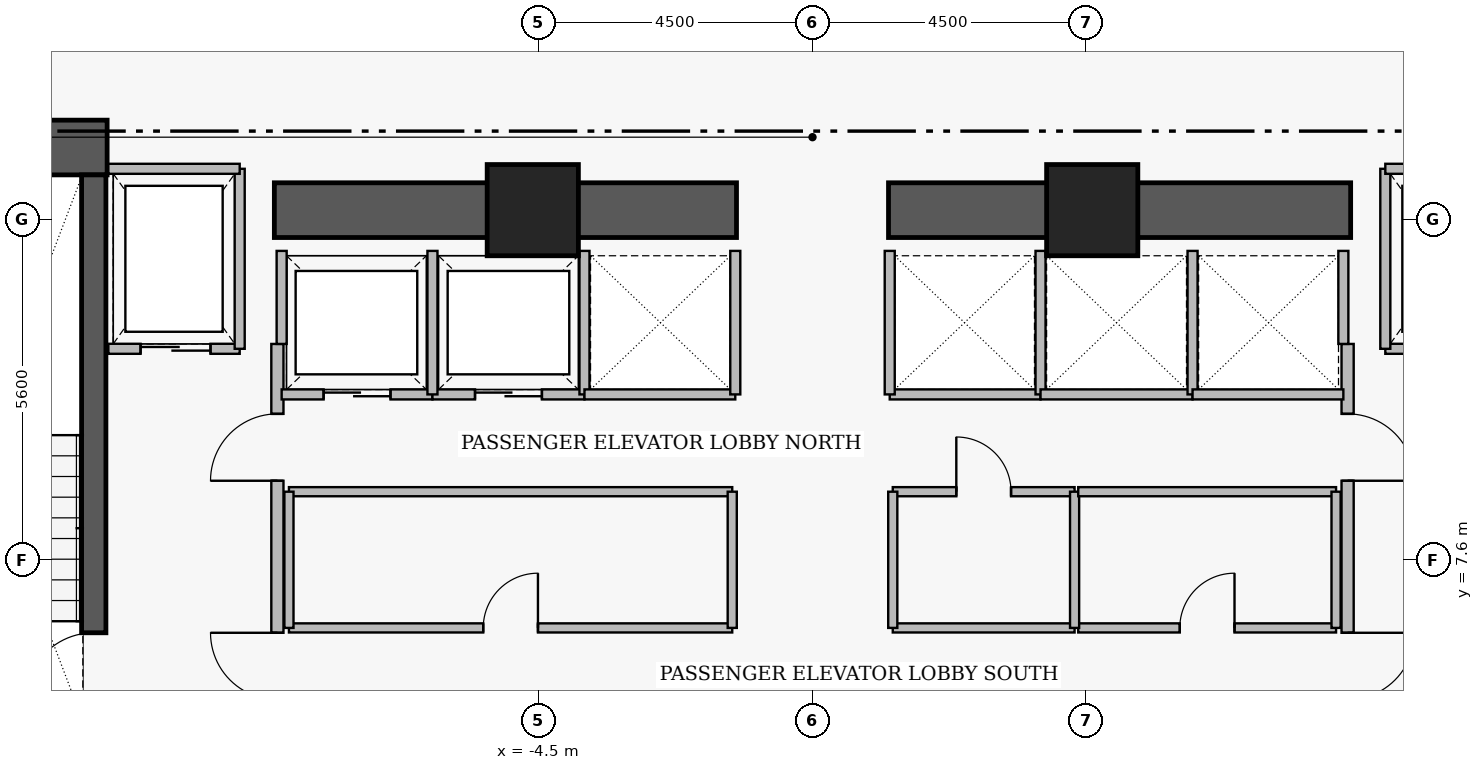
"""IFC4 building model, lengths in metres.
Left out: names, types, materials, properties, quantities, classifications, styles, units other than length and angle.
Written with IfcOpenShell. Run it as: python <this file> out.ifc"""

import sys

from ifc_helpers import new_model, si_unit, direction, frame, frame_2d, origin, origin_2d, place, context, subcontext, project, spatial, rectangle, extrude, element, fill, save


model = new_model("IFC4")
c1 = context("Model", 3, precision=1e-05, world=origin(), true_north=direction((0.0, 1.0)))
c2 = subcontext(c1, "Body", "Model", "MODEL_VIEW")
j1 = project(units=[si_unit("LENGTHUNIT", "METRE"), si_unit("PLANEANGLEUNIT", "RADIAN")], contexts=[c1])
p1 = place(None, origin())
s1 = spatial("IfcSite", under=j1, at=p1, CompositionType="ELEMENT")
p2 = place(p1, origin())
s2 = spatial("IfcBuilding", under=s1, at=p2, CompositionType="ELEMENT")
p3 = place(p2, frame((0.0, 0.0, 60.45)))
s3 = spatial("IfcBuildingStorey", under=s2, at=p3, CompositionType="ELEMENT", Elevation=60.45)
p4 = place(p3, frame((-16.31, 14.38, 0.0), z_axis=(0.0, 0.0, 1.0), x_axis=(1.0, 0.0, 0.0)))
e1 = element("IfcWall", 1, at=p4, inside=s3, PredefinedType="SHEAR", context=c2, shape_type="SweptSolid", body=[
    extrude(rectangle(XDim=4.71, YDim=0.9, at=frame_2d((2.355, 0.0))), origin(), (0.0, 0.0, 1.0), 3.46),
])
for number, where, z_axis, x_axis in (
    (2, (-8.85, 13.35, 0.0), (0.0, 0.0, 1.0), (1.0, 0.0, 0.0)),
    (3, (1.25, 13.35, 0.0), (0.0, 0.0, 1.0), (1.0, 0.0, 0.0)),
):
    element("IfcWall", number, at=place(p3, frame(where, z_axis=z_axis, x_axis=x_axis)), inside=s3, PredefinedType="SHEAR", context=c2, shape_type="SweptSolid", body=[
        extrude(rectangle(XDim=7.6, YDim=0.9, at=frame_2d((3.8, 0.0))), origin(), (0.0, 0.0, 1.0), 3.43),
    ])
p5 = place(p3, frame((-11.82, 4.97, 0.0), z_axis=(0.0, 0.0, 1.0), x_axis=(0.0, 1.0, 0.0)))
e4 = element("IfcWall", 4, at=p5, inside=s3, PredefinedType="SHEAR", context=c2, shape_type="SweptSolid", body=[
    extrude(rectangle(XDim=8.96, YDim=0.4, at=frame_2d((4.48, 0.0))), origin(), (0.0, 0.0, 1.0), 3.46),
])
p6 = place(p5, frame((0.31, 0.0, 0.0)))
e5 = element("IfcOpeningElement", 5, at=p6, cuts=e4, PredefinedType="OPENING", context=c2, shape_type="SweptSolid", body=[
    extrude(rectangle(XDim=1.12, YDim=2.22, at=frame_2d((0.56, 1.11))), frame((0.0, 0.21, 0.0), z_axis=(0.0, -1.0, 0.0), x_axis=(1.0, 0.0, 0.0)), (0.0, 0.0, 1.0), 0.42),
])
for number, where, z_axis, x_axis in (
    (6, (-4.6, 13.35, 0.0), (0.0, 0.0, 1.0), (1.0, 0.0, 0.0)),
    (7, (4.6, 13.35, 0.0), (0.0, 0.0, 1.0), (1.0, 0.0, 0.0)),
):
    element("IfcColumn", number, at=place(p3, frame(where, z_axis=z_axis, x_axis=x_axis)), inside=s3, PredefinedType="COLUMN", context=c2, shape_type="SweptSolid", body=[
        extrude(rectangle(XDim=1.5, YDim=1.5, at=origin_2d()), origin(), (0.0, 0.0, 1.0), 3.65),
    ])
p7 = place(p3, frame((-8.8, 5.05, 0.0), z_axis=(0.0, 0.0, 1.0), x_axis=(0.0, 1.0, 0.0)))
e8 = element("IfcWall", 8, at=p7, inside=s3, PredefinedType="PARTITIONING", context=c2, shape_type="SweptSolid", body=[
    extrude(rectangle(XDim=6.1, YDim=0.2, at=frame_2d((3.05, 0.0))), origin(), (0.0, 0.0, 1.0), 3.43),
])
p8 = place(p7, frame((0.25, 0.0, 0.0)))
e9 = element("IfcOpeningElement", 9, at=p8, cuts=e8, PredefinedType="OPENING", context=c2, shape_type="SweptSolid", body=[
    extrude(rectangle(XDim=1.1, YDim=2.2, at=frame_2d((0.55, 1.1))), frame((0.0, 0.11, 0.0), z_axis=(0.0, -1.0, 0.0), x_axis=(1.0, 0.0, 0.0)), (0.0, 0.0, 1.0), 0.22),
])
p9 = place(p7, frame((3.85, 0.0, 0.0)))
e10 = element("IfcOpeningElement", 10, at=p9, cuts=e8, PredefinedType="OPENING", context=c2, shape_type="SweptSolid", body=[
    extrude(rectangle(XDim=1.1, YDim=2.2, at=frame_2d((0.55, 1.1))), frame((0.0, 0.11, 0.0), z_axis=(0.0, -1.0, 0.0), x_axis=(1.0, 0.0, 0.0)), (0.0, 0.0, 1.0), 0.22),
])
p10 = place(p3, frame((8.8, 11.15, 0.0), z_axis=(0.0, 0.0, 1.0), x_axis=(0.0, -1.0, 0.0)))
e11 = element("IfcWall", 11, at=p10, inside=s3, PredefinedType="PARTITIONING", context=c2, shape_type="SweptSolid", body=[
    extrude(rectangle(XDim=6.1, YDim=0.2, at=frame_2d((3.05, 0.0))), origin(), (0.0, 0.0, 1.0), 3.43),
])
p11 = place(p10, frame((1.15, 0.0, 0.0)))
e12 = element("IfcOpeningElement", 12, at=p11, cuts=e11, PredefinedType="OPENING", context=c2, shape_type="SweptSolid", body=[
    extrude(rectangle(XDim=1.1, YDim=2.2, at=frame_2d((0.55, 1.1))), frame((0.0, 0.11, 0.0), z_axis=(0.0, -1.0, 0.0), x_axis=(1.0, 0.0, 0.0)), (0.0, 0.0, 1.0), 0.22),
])
p12 = place(p10, frame((4.75, 0.0, 0.0)))
e13 = element("IfcOpeningElement", 13, at=p12, cuts=e11, PredefinedType="OPENING", context=c2, shape_type="SweptSolid", body=[
    extrude(rectangle(XDim=1.1, YDim=2.2, at=frame_2d((0.55, 1.1))), frame((0.0, 0.11, 0.0), z_axis=(0.0, -1.0, 0.0), x_axis=(1.0, 0.0, 0.0)), (0.0, 0.0, 1.0), 0.22),
])
p13 = place(p3, frame((-11.58, 11.07, 0.0), z_axis=(0.0, 0.0, 1.0), x_axis=(1.0, 0.0, 0.0)))
e14 = element("IfcWall", 14, at=p13, inside=s3, PredefinedType="PARTITIONING", context=c2, shape_type="SweptSolid", body=[
    extrude(rectangle(XDim=2.16, YDim=0.165, at=frame_2d((1.08, 0.0))), origin(), (0.0, 0.0, 1.0), 3.43),
])
p14 = place(p13, frame((0.53, 0.0, 0.0)))
e15 = element("IfcOpeningElement", 15, at=p14, cuts=e14, PredefinedType="OPENING", context=c2, shape_type="SweptSolid", body=[
    extrude(rectangle(XDim=1.15, YDim=2.25, at=frame_2d((0.575, 1.125))), frame((0.0, 0.093, 0.0), z_axis=(0.0, -1.0, 0.0), x_axis=(1.0, 0.0, 0.0)), (0.0, 0.0, 1.0), 0.185),
])
p15 = place(p3, frame((9.42, 11.07, 0.0), z_axis=(0.0, 0.0, 1.0), x_axis=(1.0, 0.0, 0.0)))
e16 = element("IfcWall", 16, at=p15, inside=s3, PredefinedType="PARTITIONING", context=c2, shape_type="SweptSolid", body=[
    extrude(rectangle(XDim=2.16, YDim=0.165, at=frame_2d((1.08, 0.0))), origin(), (0.0, 0.0, 1.0), 3.43),
])
p16 = place(p15, frame((0.53, 0.0, 0.0)))
e17 = element("IfcOpeningElement", 17, at=p16, cuts=e16, PredefinedType="OPENING", context=c2, shape_type="SweptSolid", body=[
    extrude(rectangle(XDim=1.15, YDim=2.25, at=frame_2d((0.575, 1.125))), frame((0.0, 0.093, 0.0), z_axis=(0.0, -1.0, 0.0), x_axis=(1.0, 0.0, 0.0)), (0.0, 0.0, 1.0), 0.185),
])
p17 = place(p3, frame((-8.73, 10.32, 0.0), z_axis=(0.0, 0.0, 1.0), x_axis=(1.0, 0.0, 0.0)))
e18 = element("IfcWall", 18, at=p17, inside=s3, PredefinedType="PARTITIONING", context=c2, shape_type="SweptSolid", body=[
    extrude(rectangle(XDim=2.48, YDim=0.165, at=frame_2d((1.24, 0.0))), origin(), (0.0, 0.0, 1.0), 3.43),
])
p18 = place(p17, frame((0.69, 0.0, 0.0)))
e19 = element("IfcOpeningElement", 19, at=p18, cuts=e18, PredefinedType="OPENING", context=c2, shape_type="SweptSolid", body=[
    extrude(rectangle(XDim=1.1, YDim=2.25, at=frame_2d((0.55, 1.125))), frame((0.0, 0.093, 0.0), z_axis=(0.0, -1.0, 0.0), x_axis=(1.0, 0.0, 0.0)), (0.0, 0.0, 1.0), 0.185),
])
p19 = place(p3, frame((-6.25, 10.32, 0.0), z_axis=(0.0, 0.0, 1.0), x_axis=(1.0, 0.0, 0.0)))
e20 = element("IfcWall", 20, at=p19, inside=s3, PredefinedType="PARTITIONING", context=c2, shape_type="SweptSolid", body=[
    extrude(rectangle(XDim=2.5, YDim=0.165, at=frame_2d((1.25, 0.0))), origin(), (0.0, 0.0, 1.0), 3.43),
])
p20 = place(p19, frame((0.7, 0.0, 0.0)))
e21 = element("IfcOpeningElement", 21, at=p20, cuts=e20, PredefinedType="OPENING", context=c2, shape_type="SweptSolid", body=[
    extrude(rectangle(XDim=1.1, YDim=2.25, at=frame_2d((0.55, 1.125))), frame((0.0, 0.093, 0.0), z_axis=(0.0, -1.0, 0.0), x_axis=(1.0, 0.0, 0.0)), (0.0, 0.0, 1.0), 0.185),
])
p21 = place(p3, frame((-8.61, 6.48, 0.0), z_axis=(0.0, 0.0, 1.0), x_axis=(1.0, 0.0, 0.0)))
e22 = element("IfcWall", 22, at=p21, inside=s3, PredefinedType="PARTITIONING", context=c2, shape_type="SweptSolid", body=[
    extrude(rectangle(XDim=7.29, YDim=0.15, at=frame_2d((3.645, 0.0))), origin(), (0.0, 0.0, 1.0), 3.43),
])
p22 = place(p21, frame((3.195, 0.0, 0.0)))
e23 = element("IfcOpeningElement", 23, at=p22, cuts=e22, PredefinedType="OPENING", context=c2, shape_type="SweptSolid", body=[
    extrude(rectangle(XDim=0.9, YDim=2.15, at=frame_2d((0.45, 1.075))), frame((0.0, 0.085, 0.0), z_axis=(0.0, -1.0, 0.0), x_axis=(1.0, 0.0, 0.0)), (0.0, 0.0, 1.0), 0.17),
])
p23 = place(p3, frame((1.32, 8.72, 0.0), z_axis=(0.0, 0.0, 1.0), x_axis=(1.0, 0.0, 0.0)))
e24 = element("IfcWall", 24, at=p23, inside=s3, PredefinedType="PARTITIONING", context=c2, shape_type="SweptSolid", body=[
    extrude(rectangle(XDim=2.99, YDim=0.15, at=frame_2d((1.495, 0.0))), origin(), (0.0, 0.0, 1.0), 3.43),
])
p24 = place(p23, frame((1.045, 0.0, 0.0)))
e25 = element("IfcOpeningElement", 25, at=p24, cuts=e24, PredefinedType="OPENING", context=c2, shape_type="SweptSolid", body=[
    extrude(rectangle(XDim=0.9, YDim=2.15, at=frame_2d((0.45, 1.075))), frame((0.0, 0.085, 0.0), z_axis=(0.0, -1.0, 0.0), x_axis=(1.0, 0.0, 0.0)), (0.0, 0.0, 1.0), 0.17),
])
p25 = place(p3, frame((4.37, 6.48, 0.0), z_axis=(0.0, 0.0, 1.0), x_axis=(1.0, 0.0, 0.0)))
e26 = element("IfcWall", 26, at=p25, inside=s3, PredefinedType="PARTITIONING", context=c2, shape_type="SweptSolid", body=[
    extrude(rectangle(XDim=4.24, YDim=0.15, at=frame_2d((2.12, 0.0))), origin(), (0.0, 0.0, 1.0), 3.43),
])
p26 = place(p25, frame((1.67, 0.0, 0.0)))
e27 = element("IfcOpeningElement", 27, at=p26, cuts=e26, PredefinedType="OPENING", context=c2, shape_type="SweptSolid", body=[
    extrude(rectangle(XDim=0.9, YDim=2.15, at=frame_2d((0.45, 1.075))), frame((0.0, 0.085, 0.0), z_axis=(0.0, -1.0, 0.0), x_axis=(1.0, 0.0, 0.0)), (0.0, 0.0, 1.0), 0.17),
])
p27 = place(p3, frame((-9.42, 11.07, 0.0), z_axis=(0.0, 0.0, 1.0), x_axis=(0.0, 1.0, 0.0)))
e28 = element("IfcWall", 28, at=p27, inside=s3, PredefinedType="PARTITIONING", context=c2, shape_type="SweptSolid", body=[
    extrude(rectangle(XDim=2.96, YDim=0.165, at=frame_2d((1.48, 0.0))), origin(), (0.0, 0.0, 1.0), 3.43),
])
p28 = place(p3, frame((-11.58, 14.03, 0.0), z_axis=(0.0, 0.0, 1.0), x_axis=(1.0, 0.0, 0.0)))
e29 = element("IfcWall", 29, at=p28, inside=s3, PredefinedType="PARTITIONING", context=c2, shape_type="SweptSolid", body=[
    extrude(rectangle(XDim=2.16, YDim=0.165, at=frame_2d((1.08, 0.0))), origin(), (0.0, 0.0, 1.0), 3.43),
])
p29 = place(p3, frame((9.42, 11.07, 0.0), z_axis=(0.0, 0.0, 1.0), x_axis=(0.0, 1.0, 0.0)))
e30 = element("IfcWall", 30, at=p29, inside=s3, PredefinedType="PARTITIONING", context=c2, shape_type="SweptSolid", body=[
    extrude(rectangle(XDim=2.96, YDim=0.165, at=frame_2d((1.48, 0.0))), origin(), (0.0, 0.0, 1.0), 3.43),
])
p30 = place(p3, frame((9.42, 14.03, 0.0), z_axis=(0.0, 0.0, 1.0), x_axis=(1.0, 0.0, 0.0)))
e31 = element("IfcWall", 31, at=p30, inside=s3, PredefinedType="PARTITIONING", context=c2, shape_type="SweptSolid", body=[
    extrude(rectangle(XDim=2.16, YDim=0.165, at=frame_2d((1.08, 0.0))), origin(), (0.0, 0.0, 1.0), 3.43),
])
p31 = place(p3, frame((-8.73, 11.15, 0.0), z_axis=(0.0, 0.0, 1.0), x_axis=(0.0, 1.0, 0.0)))
e32 = element("IfcWall", 32, at=p31, inside=s3, PredefinedType="PARTITIONING", context=c2, shape_type="SweptSolid", body=[
    extrude(rectangle(XDim=1.53, YDim=0.165, at=frame_2d((0.765, 0.0))), origin(), (0.0, 0.0, 1.0), 3.43),
])
for number, where, z_axis, x_axis in (
    (33, (-6.25, 10.32, 0.0), (0.0, 0.0, 1.0), (0.0, 1.0, 0.0)),
    (34, (-3.75, 10.32, 0.0), (0.0, 0.0, 1.0), (0.0, 1.0, 0.0)),
):
    element("IfcWall", number, at=place(p3, frame(where, z_axis=z_axis, x_axis=x_axis)), inside=s3, PredefinedType="PARTITIONING", context=c2, shape_type="SweptSolid", body=[
        extrude(rectangle(XDim=2.36, YDim=0.165, at=frame_2d((1.18, 0.0))), origin(), (0.0, 0.0, 1.0), 3.43),
    ])
p32 = place(p3, frame((-3.75, 10.32, 0.0), z_axis=(0.0, 0.0, 1.0), x_axis=(1.0, 0.0, 0.0)))
e35 = element("IfcWall", 35, at=p32, inside=s3, PredefinedType="PARTITIONING", context=c2, shape_type="SweptSolid", body=[
    extrude(rectangle(XDim=2.48, YDim=0.165, at=frame_2d((1.24, 0.0))), origin(), (0.0, 0.0, 1.0), 3.43),
])
p33 = place(p3, frame((-1.27, 10.32, 0.0), z_axis=(0.0, 0.0, 1.0), x_axis=(0.0, 1.0, 0.0)))
e36 = element("IfcWall", 36, at=p33, inside=s3, PredefinedType="PARTITIONING", context=c2, shape_type="SweptSolid", body=[
    extrude(rectangle(XDim=2.36, YDim=0.165, at=frame_2d((1.18, 0.0))), origin(), (0.0, 0.0, 1.0), 3.43),
])
p34 = place(p3, frame((1.27, 10.32, 0.0), z_axis=(0.0, 0.0, 1.0), x_axis=(1.0, 0.0, 0.0)))
e37 = element("IfcWall", 37, at=p34, inside=s3, PredefinedType="PARTITIONING", context=c2, shape_type="SweptSolid", body=[
    extrude(rectangle(XDim=2.48, YDim=0.165, at=frame_2d((1.24, 0.0))), origin(), (0.0, 0.0, 1.0), 3.43),
])
for number, where, z_axis, x_axis in (
    (38, (1.27, 10.32, 0.0), (0.0, 0.0, 1.0), (0.0, 1.0, 0.0)),
    (39, (3.75, 10.32, 0.0), (0.0, 0.0, 1.0), (0.0, 1.0, 0.0)),
):
    element("IfcWall", number, at=place(p3, frame(where, z_axis=z_axis, x_axis=x_axis)), inside=s3, PredefinedType="PARTITIONING", context=c2, shape_type="SweptSolid", body=[
        extrude(rectangle(XDim=2.36, YDim=0.165, at=frame_2d((1.18, 0.0))), origin(), (0.0, 0.0, 1.0), 3.43),
    ])
p35 = place(p3, frame((3.75, 10.32, 0.0), z_axis=(0.0, 0.0, 1.0), x_axis=(1.0, 0.0, 0.0)))
e40 = element("IfcWall", 40, at=p35, inside=s3, PredefinedType="PARTITIONING", context=c2, shape_type="SweptSolid", body=[
    extrude(rectangle(XDim=2.5, YDim=0.165, at=frame_2d((1.25, 0.0))), origin(), (0.0, 0.0, 1.0), 3.43),
])
p36 = place(p3, frame((6.25, 10.32, 0.0), z_axis=(0.0, 0.0, 1.0), x_axis=(0.0, 1.0, 0.0)))
e41 = element("IfcWall", 41, at=p36, inside=s3, PredefinedType="PARTITIONING", context=c2, shape_type="SweptSolid", body=[
    extrude(rectangle(XDim=2.36, YDim=0.165, at=frame_2d((1.18, 0.0))), origin(), (0.0, 0.0, 1.0), 3.43),
])
p37 = place(p3, frame((6.25, 10.32, 0.0), z_axis=(0.0, 0.0, 1.0), x_axis=(1.0, 0.0, 0.0)))
e42 = element("IfcWall", 42, at=p37, inside=s3, PredefinedType="PARTITIONING", context=c2, shape_type="SweptSolid", body=[
    extrude(rectangle(XDim=2.48, YDim=0.165, at=frame_2d((1.24, 0.0))), origin(), (0.0, 0.0, 1.0), 3.43),
])
p38 = place(p3, frame((8.73, 11.15, 0.0), z_axis=(0.0, 0.0, 1.0), x_axis=(0.0, 1.0, 0.0)))
e43 = element("IfcWall", 43, at=p38, inside=s3, PredefinedType="PARTITIONING", context=c2, shape_type="SweptSolid", body=[
    extrude(rectangle(XDim=1.53, YDim=0.165, at=frame_2d((0.765, 0.0))), origin(), (0.0, 0.0, 1.0), 3.43),
])
p39 = place(p3, frame((-8.61, 8.72, 0.0), z_axis=(0.0, 0.0, 1.0), x_axis=(1.0, 0.0, 0.0)))
e44 = element("IfcWall", 44, at=p39, inside=s3, PredefinedType="PARTITIONING", context=c2, shape_type="SweptSolid", body=[
    extrude(rectangle(XDim=7.29, YDim=0.15, at=frame_2d((3.645, 0.0))), origin(), (0.0, 0.0, 1.0), 3.43),
])
for number, where, z_axis, x_axis in (
    (45, (-8.61, 6.48, 0.0), (0.0, 0.0, 1.0), (0.0, 1.0, 0.0)),
    (46, (-1.32, 6.48, 0.0), (0.0, 0.0, 1.0), (0.0, 1.0, 0.0)),
):
    element("IfcWall", number, at=place(p3, frame(where, z_axis=z_axis, x_axis=x_axis)), inside=s3, PredefinedType="PARTITIONING", context=c2, shape_type="SweptSolid", body=[
        extrude(rectangle(XDim=2.24, YDim=0.15, at=frame_2d((1.12, 0.0))), origin(), (0.0, 0.0, 1.0), 3.43),
    ])
p40 = place(p3, frame((1.32, 6.48, 0.0), z_axis=(0.0, 0.0, 1.0), x_axis=(1.0, 0.0, 0.0)))
e47 = element("IfcWall", 47, at=p40, inside=s3, PredefinedType="PARTITIONING", context=c2, shape_type="SweptSolid", body=[
    extrude(rectangle(XDim=2.99, YDim=0.15, at=frame_2d((1.495, 0.0))), origin(), (0.0, 0.0, 1.0), 3.43),
])
for number, where, z_axis, x_axis in (
    (48, (1.32, 6.48, 0.0), (0.0, 0.0, 1.0), (0.0, 1.0, 0.0)),
    (49, (4.31, 6.48, 0.0), (0.0, 0.0, 1.0), (0.0, 1.0, 0.0)),
):
    element("IfcWall", number, at=place(p3, frame(where, z_axis=z_axis, x_axis=x_axis)), inside=s3, PredefinedType="PARTITIONING", context=c2, shape_type="SweptSolid", body=[
        extrude(rectangle(XDim=2.24, YDim=0.15, at=frame_2d((1.12, 0.0))), origin(), (0.0, 0.0, 1.0), 3.43),
    ])
p41 = place(p3, frame((4.37, 8.72, 0.0), z_axis=(0.0, 0.0, 1.0), x_axis=(1.0, 0.0, 0.0)))
e50 = element("IfcWall", 50, at=p41, inside=s3, PredefinedType="PARTITIONING", context=c2, shape_type="SweptSolid", body=[
    extrude(rectangle(XDim=4.24, YDim=0.15, at=frame_2d((2.12, 0.0))), origin(), (0.0, 0.0, 1.0), 3.43),
])
p42 = place(p3, frame((8.61, 6.48, 0.0), z_axis=(0.0, 0.0, 1.0), x_axis=(0.0, 1.0, 0.0)))
e51 = element("IfcWall", 51, at=p42, inside=s3, PredefinedType="PARTITIONING", context=c2, shape_type="SweptSolid", body=[
    extrude(rectangle(XDim=2.24, YDim=0.15, at=frame_2d((1.12, 0.0))), origin(), (0.0, 0.0, 1.0), 3.43),
])
p43 = place(p6, origin())
e52 = element("IfcDoor", 52, at=p43, inside=s3, OperationType="SINGLE_SWING_LEFT", PredefinedType="DOOR", context=c2, shape_type="SweptSolid", body=[
    extrude(rectangle(XDim=1.12, YDim=2.22, at=frame_2d((0.56, 1.11))), frame((0.0, 0.025, 0.0), z_axis=(0.0, -1.0, 0.0), x_axis=(1.0, 0.0, 0.0)), (0.0, 0.0, 1.0), 0.05),
])
fill(e5, e52)
p44 = place(p8, origin())
e53 = element("IfcDoor", 53, at=p44, inside=s3, OperationType="SINGLE_SWING_RIGHT", PredefinedType="DOOR", context=c2, shape_type="SweptSolid", body=[
    extrude(rectangle(XDim=1.1, YDim=2.2, at=frame_2d((0.55, 1.1))), frame((0.0, 0.025, 0.0), z_axis=(0.0, -1.0, 0.0), x_axis=(1.0, 0.0, 0.0)), (0.0, 0.0, 1.0), 0.05),
])
fill(e9, e53)
p45 = place(p9, origin())
e54 = element("IfcDoor", 54, at=p45, inside=s3, OperationType="SINGLE_SWING_LEFT", PredefinedType="DOOR", context=c2, shape_type="SweptSolid", body=[
    extrude(rectangle(XDim=1.1, YDim=2.2, at=frame_2d((0.55, 1.1))), frame((0.0, 0.025, 0.0), z_axis=(0.0, -1.0, 0.0), x_axis=(1.0, 0.0, 0.0)), (0.0, 0.0, 1.0), 0.05),
])
fill(e10, e54)
p46 = place(p11, origin())
e55 = element("IfcDoor", 55, at=p46, inside=s3, OperationType="SINGLE_SWING_RIGHT", PredefinedType="DOOR", context=c2, shape_type="SweptSolid", body=[
    extrude(rectangle(XDim=1.1, YDim=2.2, at=frame_2d((0.55, 1.1))), frame((0.0, 0.025, 0.0), z_axis=(0.0, -1.0, 0.0), x_axis=(1.0, 0.0, 0.0)), (0.0, 0.0, 1.0), 0.05),
])
fill(e12, e55)
p47 = place(p12, origin())
e56 = element("IfcDoor", 56, at=p47, inside=s3, OperationType="SINGLE_SWING_LEFT", PredefinedType="DOOR", context=c2, shape_type="SweptSolid", body=[
    extrude(rectangle(XDim=1.1, YDim=2.2, at=frame_2d((0.55, 1.1))), frame((0.0, 0.025, 0.0), z_axis=(0.0, -1.0, 0.0), x_axis=(1.0, 0.0, 0.0)), (0.0, 0.0, 1.0), 0.05),
])
fill(e13, e56)
p48 = place(p14, origin())
e57 = element("IfcDoor", 57, at=p48, inside=s3, OperationType="SLIDING_TO_LEFT", PredefinedType="DOOR", context=c2, shape_type="SweptSolid", body=[
    extrude(rectangle(XDim=1.15, YDim=2.25, at=frame_2d((0.575, 1.125))), frame((0.0, 0.025, 0.0), z_axis=(0.0, -1.0, 0.0), x_axis=(1.0, 0.0, 0.0)), (0.0, 0.0, 1.0), 0.05),
])
fill(e15, e57)
p49 = place(p18, origin())
e58 = element("IfcDoor", 58, at=p49, inside=s3, OperationType="SLIDING_TO_LEFT", PredefinedType="DOOR", context=c2, shape_type="SweptSolid", body=[
    extrude(rectangle(XDim=1.1, YDim=2.25, at=frame_2d((0.55, 1.125))), frame((0.0, 0.025, 0.0), z_axis=(0.0, -1.0, 0.0), x_axis=(1.0, 0.0, 0.0)), (0.0, 0.0, 1.0), 0.05),
])
fill(e19, e58)
p50 = place(p20, origin())
e59 = element("IfcDoor", 59, at=p50, inside=s3, OperationType="SLIDING_TO_LEFT", PredefinedType="DOOR", context=c2, shape_type="SweptSolid", body=[
    extrude(rectangle(XDim=1.1, YDim=2.25, at=frame_2d((0.55, 1.125))), frame((0.0, 0.025, 0.0), z_axis=(0.0, -1.0, 0.0), x_axis=(1.0, 0.0, 0.0)), (0.0, 0.0, 1.0), 0.05),
])
fill(e21, e59)
p51 = place(p22, origin())
e60 = element("IfcDoor", 60, at=p51, inside=s3, OperationType="SINGLE_SWING_RIGHT", PredefinedType="DOOR", context=c2, shape_type="SweptSolid", body=[
    extrude(rectangle(XDim=0.9, YDim=2.15, at=frame_2d((0.45, 1.075))), frame((0.0, 0.025, 0.0), z_axis=(0.0, -1.0, 0.0), x_axis=(1.0, 0.0, 0.0)), (0.0, 0.0, 1.0), 0.05),
])
fill(e23, e60)
p52 = place(p24, origin())
e61 = element("IfcDoor", 61, at=p52, inside=s3, OperationType="SINGLE_SWING_LEFT", PredefinedType="DOOR", context=c2, shape_type="SweptSolid", body=[
    extrude(rectangle(XDim=0.9, YDim=2.15, at=frame_2d((0.45, 1.075))), frame((0.0, 0.025, 0.0), z_axis=(0.0, -1.0, 0.0), x_axis=(1.0, 0.0, 0.0)), (0.0, 0.0, 1.0), 0.05),
])
fill(e25, e61)
p53 = place(p26, origin())
e62 = element("IfcDoor", 62, at=p53, inside=s3, OperationType="SINGLE_SWING_RIGHT", PredefinedType="DOOR", context=c2, shape_type="SweptSolid", body=[
    extrude(rectangle(XDim=0.9, YDim=2.15, at=frame_2d((0.45, 1.075))), frame((0.0, 0.025, 0.0), z_axis=(0.0, -1.0, 0.0), x_axis=(1.0, 0.0, 0.0)), (0.0, 0.0, 1.0), 0.05),
])
fill(e27, e62)
save(model, sys.argv[1])
